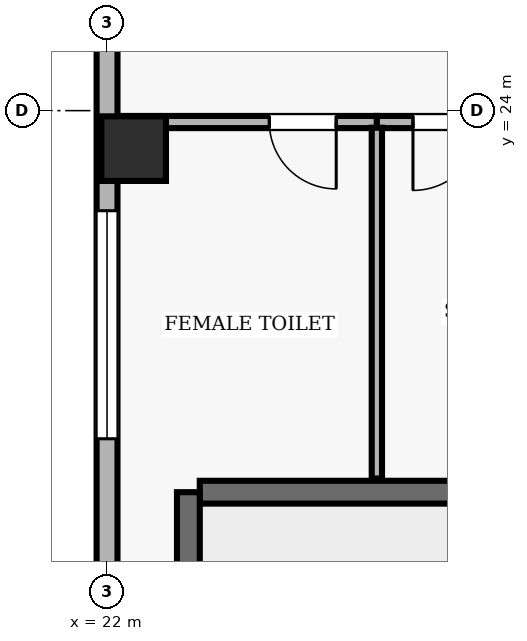
"""IFC4 building model, lengths in metres.
Left out: names, types, materials, properties, quantities, classifications, styles, units other than length and angle.
Written with IfcOpenShell. Run it as: python <this file> out.ifc"""

import sys

from ifc_helpers import new_model, si_unit, direction, frame, frame_2d, origin, origin_2d, place, context, subcontext, project, spatial, rectangle, extrude, element, fill, save


model = new_model("IFC4")
c1 = context("Model", 3, precision=1e-05, world=origin(), true_north=direction((0.0, 1.0)))
c2 = subcontext(c1, "Body", "Model", "MODEL_VIEW")
j1 = project(units=[si_unit("LENGTHUNIT", "METRE"), si_unit("PLANEANGLEUNIT", "RADIAN")], contexts=[c1])
p1 = place(None, origin())
s1 = spatial("IfcSite", under=j1, at=p1, CompositionType="ELEMENT")
p2 = place(p1, origin())
s2 = spatial("IfcBuilding", under=s1, at=p2, CompositionType="ELEMENT")
p3 = place(p2, frame((0.0, 0.0, 291.1)))
s3 = spatial("IfcBuildingStorey", under=s2, at=p3, CompositionType="ELEMENT", Elevation=291.1)
p4 = place(p3, frame((22.35, 23.5, 0.0), z_axis=(0.0, 0.0, 1.0), x_axis=(1.0, 0.0, 0.0)))
e1 = element("IfcColumn", 1, at=p4, inside=s3, PredefinedType="COLUMN", context=c2, shape_type="SweptSolid", body=[
    extrude(rectangle(XDim=0.85, YDim=0.85, at=origin_2d()), origin(), (0.0, 0.0, 1.0), 3.9),
])
p5 = place(p3, frame((22.0, 35.3, 0.0), z_axis=(0.0, 0.0, 1.0), x_axis=(0.0, -1.0, 0.0)))
e2 = element("IfcWall", 2, at=p5, inside=s3, PredefinedType="SOLIDWALL", context=c2, shape_type="SweptSolid", body=[
    extrude(rectangle(XDim=32.8, YDim=0.275, at=frame_2d((16.4, 0.0))), origin(), (0.0, 0.0, 1.0), 3.69),
])
p6 = place(p5, frame((7.3, 0.0, 0.0)))
e3 = element("IfcOpeningElement", 3, at=p6, cuts=e2, PredefinedType="OPENING", context=c2, shape_type="SweptSolid", body=[
    extrude(rectangle(XDim=1.0, YDim=2.2, at=frame_2d((0.5, 1.1))), frame((0.0, 0.147, 0.0), z_axis=(0.0, -1.0, 0.0), x_axis=(1.0, 0.0, 0.0)), (0.0, 0.0, 1.0), 0.295),
])
p7 = place(p5, frame((1.233, 0.0, 0.9)))
e4 = element("IfcOpeningElement", 4, at=p7, cuts=e2, PredefinedType="OPENING", context=c2, shape_type="SweptSolid", body=[
    extrude(rectangle(XDim=3.0, YDim=2.2, at=frame_2d((1.5, 1.1))), frame((0.0, 0.147, 0.0), z_axis=(0.0, -1.0, 0.0), x_axis=(1.0, 0.0, 0.0)), (0.0, 0.0, 1.0), 0.295),
])
p8 = place(p5, frame((12.617, 0.0, 0.9)))
e5 = element("IfcOpeningElement", 5, at=p8, cuts=e2, PredefinedType="OPENING", context=c2, shape_type="SweptSolid", body=[
    extrude(rectangle(XDim=3.0, YDim=2.2, at=frame_2d((1.5, 1.1))), frame((0.0, 0.147, 0.0), z_axis=(0.0, -1.0, 0.0), x_axis=(1.0, 0.0, 0.0)), (0.0, 0.0, 1.0), 0.295),
])
p9 = place(p5, frame((23.1, 0.0, 0.9)))
e6 = element("IfcOpeningElement", 6, at=p9, cuts=e2, PredefinedType="OPENING", context=c2, shape_type="SweptSolid", body=[
    extrude(rectangle(XDim=3.0, YDim=2.2, at=frame_2d((1.5, 1.1))), frame((0.0, 0.147, 0.0), z_axis=(0.0, -1.0, 0.0), x_axis=(1.0, 0.0, 0.0)), (0.0, 0.0, 1.0), 0.295),
])
p10 = place(p3, frame((31.58, 18.98, 0.0), z_axis=(0.0, 0.0, 1.0), x_axis=(-1.0, 0.0, 0.0)))
e7 = element("IfcWall", 7, at=p10, inside=s3, PredefinedType="SHEAR", context=c2, shape_type="SweptSolid", body=[
    extrude(rectangle(XDim=8.36, YDim=0.3, at=frame_2d((4.18, 0.0))), origin(), (0.0, 0.0, 1.0), 3.69),
])
p11 = place(p3, frame((23.07, 18.98, 0.0), z_axis=(0.0, 0.0, 1.0), x_axis=(0.0, -1.0, 0.0)))
e8 = element("IfcWall", 8, at=p11, inside=s3, PredefinedType="SHEAR", context=c2, shape_type="SweptSolid", body=[
    extrude(rectangle(XDim=3.51, YDim=0.3, at=frame_2d((1.755, 0.0))), origin(), (0.0, 0.0, 1.0), 3.69),
])
p12 = place(p3, frame((25.55, 23.85, 0.0), z_axis=(0.0, 0.0, 1.0), x_axis=(-1.0, 0.0, 0.0)))
e9 = element("IfcWall", 9, at=p12, inside=s3, PredefinedType="PARTITIONING", context=c2, shape_type="SweptSolid", body=[
    extrude(rectangle(XDim=3.35, YDim=0.16, at=frame_2d((1.675, 0.0))), origin(), (0.0, 0.0, 1.0), 3.227),
])
p13 = place(p12, frame((0.535, 0.0, 0.0)))
e10 = element("IfcOpeningElement", 10, at=p13, cuts=e9, PredefinedType="OPENING", context=c2, shape_type="SweptSolid", body=[
    extrude(rectangle(XDim=0.88, YDim=2.1, at=frame_2d((0.44, 1.05))), frame((0.0, 0.09, 0.0), z_axis=(0.0, -1.0, 0.0), x_axis=(1.0, 0.0, 0.0)), (0.0, 0.0, 1.0), 0.18),
])
p14 = place(p3, frame((28.8, 23.85, 0.0), z_axis=(0.0, 0.0, 1.0), x_axis=(-1.0, 0.0, 0.0)))
e11 = element("IfcWall", 11, at=p14, inside=s3, PredefinedType="PARTITIONING", context=c2, shape_type="SweptSolid", body=[
    extrude(rectangle(XDim=3.25, YDim=0.16, at=frame_2d((1.625, 0.0))), origin(), (0.0, 0.0, 1.0), 3.227),
])
p15 = place(p14, frame((1.875, 0.0, 0.0)))
e12 = element("IfcOpeningElement", 12, at=p15, cuts=e11, PredefinedType="OPENING", context=c2, shape_type="SweptSolid", body=[
    extrude(rectangle(XDim=0.9, YDim=2.1, at=frame_2d((0.45, 1.05))), frame((0.0, 0.09, 0.0), z_axis=(0.0, -1.0, 0.0), x_axis=(1.0, 0.0, 0.0)), (0.0, 0.0, 1.0), 0.18),
])
p16 = place(p3, frame((25.55, 19.16, 0.0), z_axis=(0.0, 0.0, 1.0), x_axis=(0.0, 1.0, 0.0)))
e13 = element("IfcWall", 13, at=p16, inside=s3, PredefinedType="PARTITIONING", context=c2, shape_type="SweptSolid", body=[
    extrude(rectangle(XDim=4.615, YDim=0.135, at=frame_2d((2.308, 0.0))), origin(), (0.0, 0.0, 1.0), 3.69),
])
p17 = place(p8, origin())
e14 = element("IfcWindow", 14, at=p17, inside=s3, PartitioningType="SINGLE_PANEL", PredefinedType="WINDOW", context=c2, shape_type="SweptSolid", body=[
    extrude(rectangle(XDim=3.0, YDim=2.2, at=frame_2d((1.5, 1.1))), frame((0.0, 0.03, 0.0), z_axis=(0.0, -1.0, 0.0), x_axis=(1.0, 0.0, 0.0)), (0.0, 0.0, 1.0), 0.06),
])
fill(e5, e14)
p18 = place(p13, origin())
e15 = element("IfcDoor", 15, at=p18, inside=s3, OperationType="SINGLE_SWING_LEFT", PredefinedType="DOOR", context=c2, shape_type="SweptSolid", body=[
    extrude(rectangle(XDim=0.88, YDim=2.1, at=frame_2d((0.44, 1.05))), frame((0.0, 0.025, 0.0), z_axis=(0.0, -1.0, 0.0), x_axis=(1.0, 0.0, 0.0)), (0.0, 0.0, 1.0), 0.05),
])
fill(e10, e15)
p19 = place(p15, origin())
e16 = element("IfcDoor", 16, at=p19, inside=s3, OperationType="SINGLE_SWING_RIGHT", PredefinedType="DOOR", context=c2, shape_type="SweptSolid", body=[
    extrude(rectangle(XDim=0.9, YDim=2.1, at=frame_2d((0.45, 1.05))), frame((0.0, 0.025, 0.0), z_axis=(0.0, -1.0, 0.0), x_axis=(1.0, 0.0, 0.0)), (0.0, 0.0, 1.0), 0.05),
])
fill(e12, e16)
save(model, sys.argv[1])
